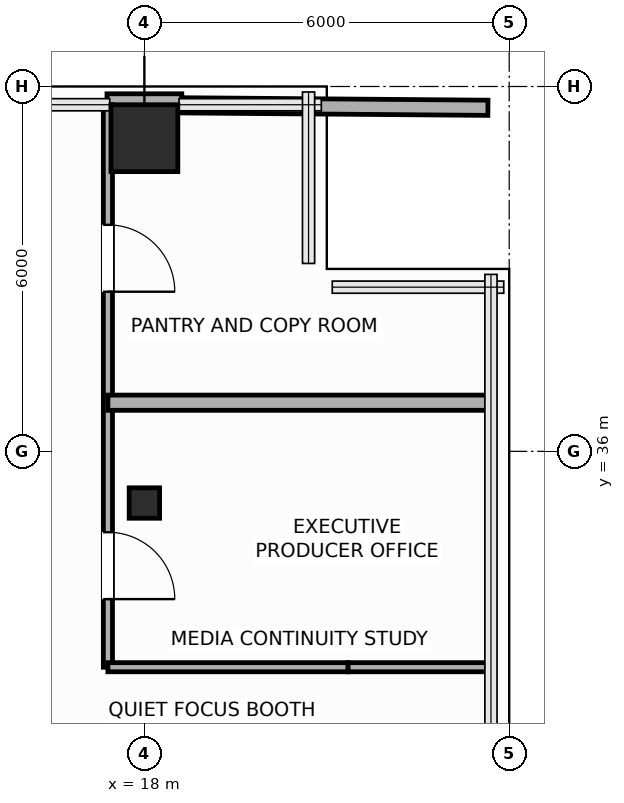
"""IFC4 building model, lengths in metres.
Left out: names, types, materials, properties, quantities, classifications, styles, units other than length and angle.
Written with IfcOpenShell. Run it as: python <this file> out.ifc"""

import sys

from ifc_helpers import new_model, si_unit, direction, frame, frame_2d, origin, origin_2d, place, context, subcontext, project, spatial, rectangle, hollow_rectangle, extrude, element, fill, save


model = new_model("IFC4")
c1 = context("Model", 3, precision=1e-05, world=origin(), true_north=direction((0.0, 1.0)))
c2 = subcontext(c1, "Body", "Model", "MODEL_VIEW")
j1 = project(units=[si_unit("LENGTHUNIT", "METRE"), si_unit("PLANEANGLEUNIT", "RADIAN")], contexts=[c1])
p1 = place(None, origin())
s1 = spatial("IfcSite", under=j1, at=p1, CompositionType="ELEMENT")
p2 = place(p1, origin())
s2 = spatial("IfcBuilding", under=s1, at=p2, CompositionType="ELEMENT")
p3 = place(p2, frame((0.0, 0.0, 126.9)))
s3 = spatial("IfcBuildingStorey", under=s2, at=p3, CompositionType="ELEMENT", Elevation=126.9)
p4 = place(p3, frame((18.0, 35.15, 0.0), z_axis=(0.0, 0.0, 1.0), x_axis=(1.0, 0.0, 0.0)))
e1 = element("IfcColumn", 1, at=p4, inside=s3, PredefinedType="COLUMN", context=c2, shape_type="SweptSolid", body=[
    extrude(hollow_rectangle(XDim=0.5, YDim=0.5, WallThickness=0.025, InnerFilletRadius=0.025, OuterFilletRadius=0.04, at=origin_2d()), origin(), (0.0, 0.0, 1.0), 3.75),
])
p5 = place(p3, frame((18.0, 41.15, 0.0), z_axis=(0.0, 0.0, 1.0), x_axis=(1.0, 0.0, 0.0)))
e2 = element("IfcColumn", 2, at=p5, inside=s3, PredefinedType="COLUMN", context=c2, shape_type="SweptSolid", body=[
    extrude(rectangle(XDim=1.1, YDim=1.1, at=origin_2d()), origin(), (0.0, 0.0, 1.0), 3.75),
])
p6 = place(p3, frame((17.385, 41.76, 0.0), z_axis=(0.0, 0.0, 1.0), x_axis=(1.0, 0.0, 0.0)))
e3 = element("IfcWall", 3, at=p6, inside=s3, PredefinedType="SOLIDWALL", context=c2, shape_type="SweptSolid", body=[
    extrude(rectangle(XDim=1.23, YDim=0.24, at=frame_2d((0.615, 0.0))), origin(), (0.0, 0.0, 1.0), 3.525),
])
p7 = place(p3, frame((17.4, 41.7, 0.0), z_axis=(0.0, 0.0, 1.0), x_axis=(0.0, -1.0, 0.0)))
e4 = element("IfcWall", 4, at=p7, inside=s3, PredefinedType="PARTITIONING", context=c2, shape_type="SweptSolid", body=[
    extrude(rectangle(XDim=9.25, YDim=0.15, at=frame_2d((4.625, 0.0))), origin(), (0.0, 0.0, 1.0), 3.525),
])
p8 = place(p7, frame((7.03, 0.0, 0.0)))
e5 = element("IfcOpeningElement", 5, at=p8, cuts=e4, PredefinedType="OPENING", context=c2, shape_type="SweptSolid", body=[
    extrude(rectangle(XDim=1.1, YDim=2.25, at=frame_2d((0.55, 1.125))), frame((0.0, 0.085, 0.0), z_axis=(0.0, -1.0, 0.0), x_axis=(1.0, 0.0, 0.0)), (0.0, 0.0, 1.0), 0.17),
])
p9 = place(p7, frame((1.975, 0.0, 0.0)))
e6 = element("IfcOpeningElement", 6, at=p9, cuts=e4, PredefinedType="OPENING", context=c2, shape_type="SweptSolid", body=[
    extrude(rectangle(XDim=1.1, YDim=2.25, at=frame_2d((0.55, 1.125))), frame((0.0, 0.085, 0.0), z_axis=(0.0, -1.0, 0.0), x_axis=(1.0, 0.0, 0.0)), (0.0, 0.0, 1.0), 0.17),
])
p10 = place(p3, frame((17.4, 32.45, 0.0), z_axis=(0.0, 0.0, 1.0), x_axis=(1.0, 0.0, 0.0)))
e7 = element("IfcWall", 7, at=p10, inside=s3, PredefinedType="PARTITIONING", context=c2, shape_type="SweptSolid", body=[
    extrude(rectangle(XDim=3.95, YDim=0.15, at=frame_2d((1.975, 0.0))), origin(), (0.0, 0.0, 1.0), 3.525),
])
p11 = place(p3, frame((21.35, 32.45, 0.0), z_axis=(0.0, 0.0, 1.0), x_axis=(1.0, 0.0, 0.0)))
e8 = element("IfcWall", 8, at=p11, inside=s3, PredefinedType="PARTITIONING", context=c2, shape_type="SweptSolid", body=[
    extrude(rectangle(XDim=2.35, YDim=0.15, at=frame_2d((1.175, 0.0))), origin(), (0.0, 0.0, 1.0), 3.525),
])
p12 = place(p3, frame((17.4, 36.8, 0.0), z_axis=(0.0, 0.0, 1.0), x_axis=(1.0, 0.0, 0.0)))
e9 = element("IfcWall", 9, at=p12, inside=s3, PredefinedType="PARTITIONING", context=c2, shape_type="SweptSolid", body=[
    extrude(rectangle(XDim=6.3, YDim=0.25, at=frame_2d((3.15, 0.0))), origin(), (0.0, 0.0, 1.0), 3.525),
])
p13 = place(p3, frame((18.615, 41.69, 0.0), z_axis=(0.0, 0.0, 1.0), x_axis=(0.99996799533, -0.008000519771, 0.0)))
e10 = element("IfcWall", 10, at=p13, inside=s3, PredefinedType="PARTITIONING", context=c2, shape_type="SweptSolid", body=[
    extrude(rectangle(XDim=5.035, YDim=0.25, at=frame_2d((2.518, 0.0))), origin(), (0.0, 0.0, 1.0), 3.525),
])
p14 = place(p8, origin())
e11 = element("IfcDoor", 11, at=p14, inside=s3, OperationType="SINGLE_SWING_RIGHT", PredefinedType="DOOR", context=c2, shape_type="SweptSolid", body=[
    extrude(rectangle(XDim=1.1, YDim=2.25, at=frame_2d((0.55, 1.125))), frame((0.0, 0.025, 0.0), z_axis=(0.0, -1.0, 0.0), x_axis=(1.0, 0.0, 0.0)), (0.0, 0.0, 1.0), 0.05),
])
fill(e5, e11)
p15 = place(p9, origin())
e12 = element("IfcDoor", 12, at=p15, inside=s3, OperationType="SINGLE_SWING_RIGHT", PredefinedType="DOOR", context=c2, shape_type="SweptSolid", body=[
    extrude(rectangle(XDim=1.1, YDim=2.25, at=frame_2d((0.55, 1.125))), frame((0.0, 0.025, 0.0), z_axis=(0.0, -1.0, 0.0), x_axis=(1.0, 0.0, 0.0)), (0.0, 0.0, 1.0), 0.05),
])
fill(e6, e12)
save(model, sys.argv[1])
